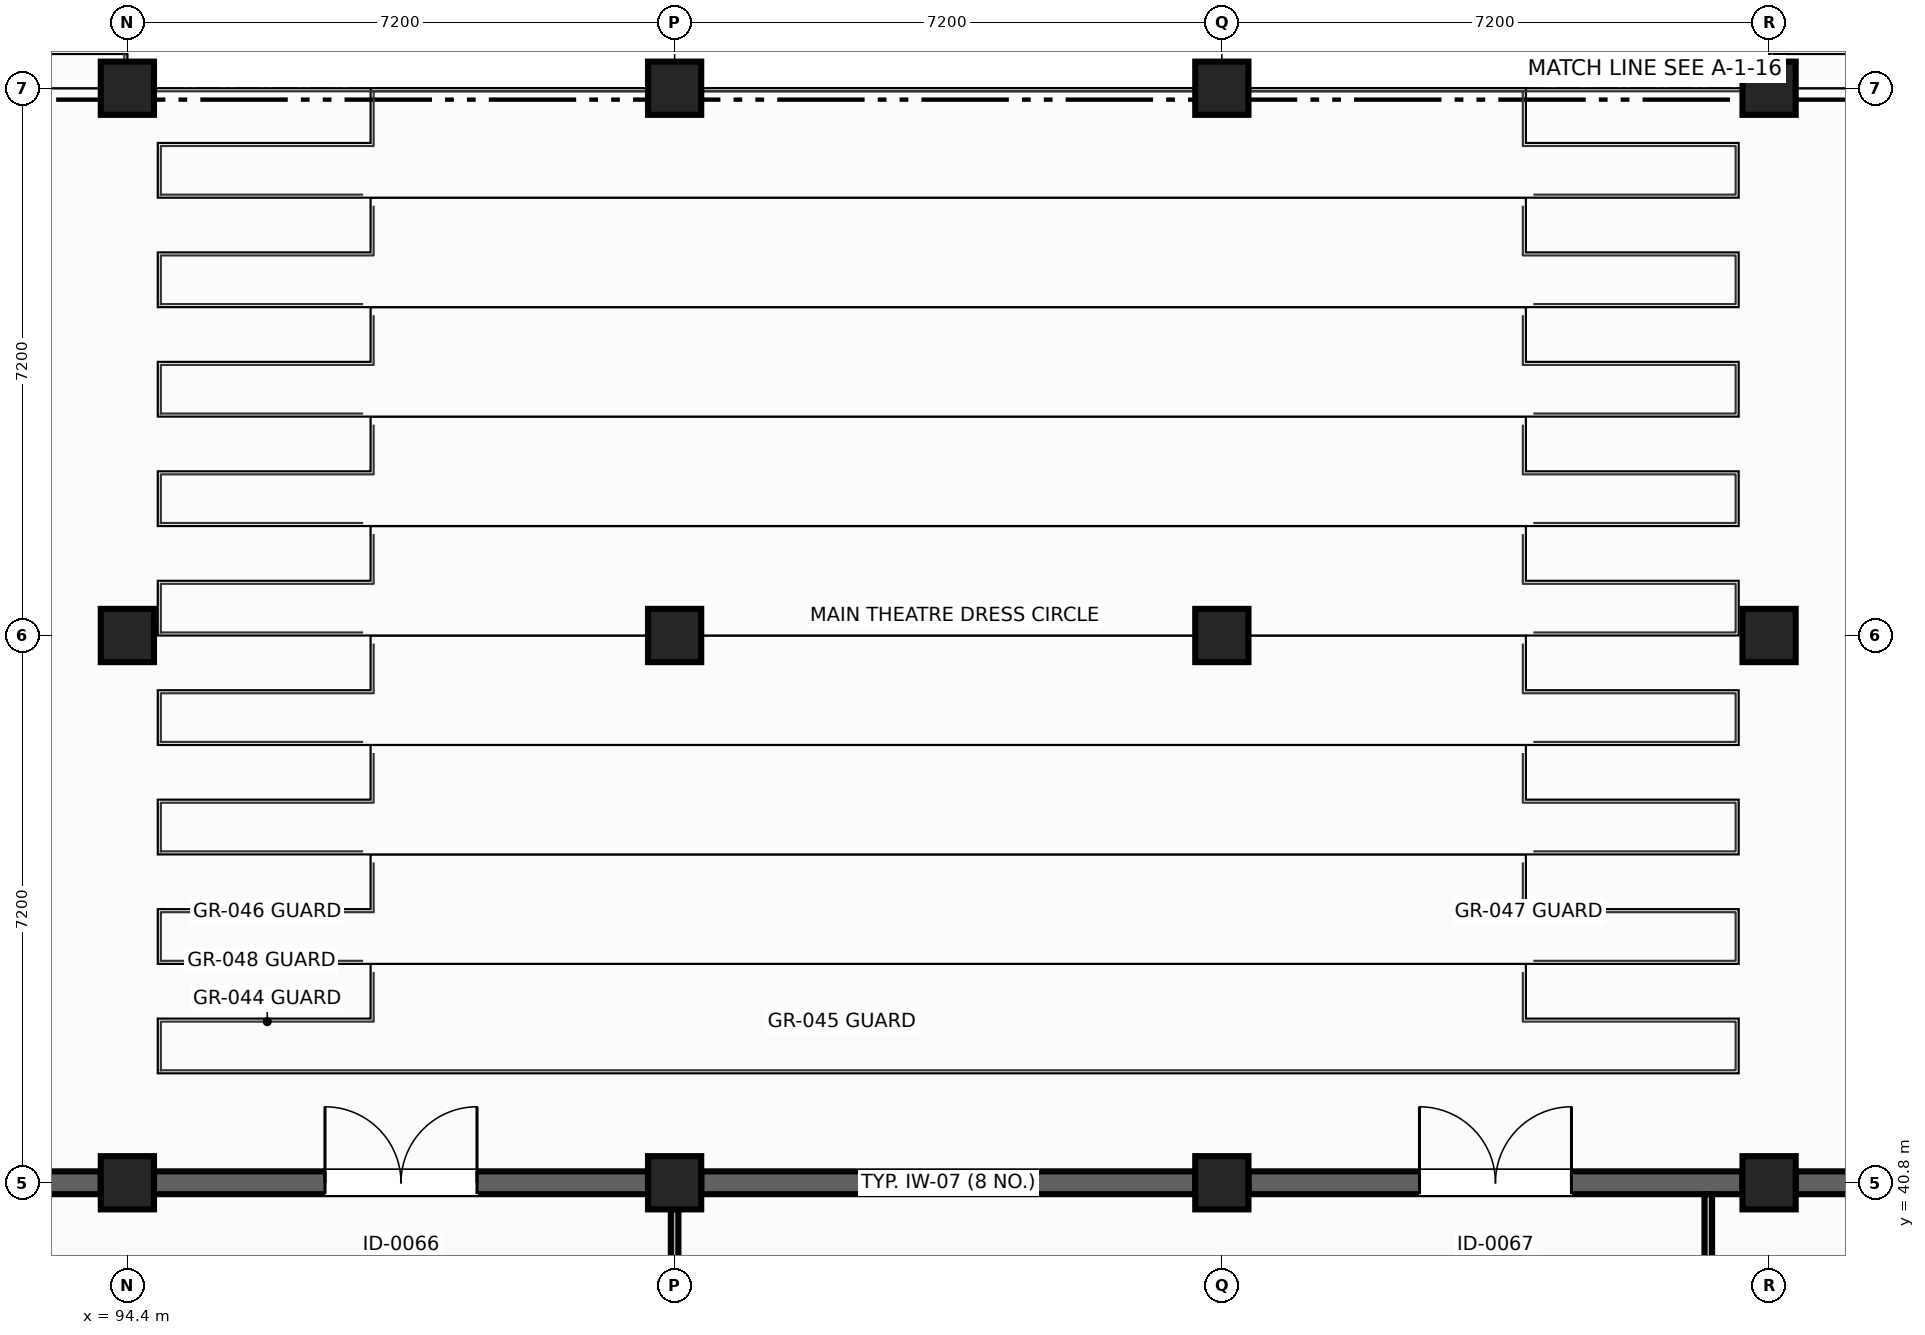
"""IFC4 building model, lengths in metres.
Left out: names, types, materials, properties, quantities, classifications, styles, units other than length and angle.
Written with IfcOpenShell. Run it as: python <this file> out.ifc"""

import sys

from ifc_helpers import new_model, si_unit, direction, frame, frame_2d, origin, origin_2d, place, context, subcontext, project, spatial, rectangle, extrude, element, fill, save


model = new_model("IFC4")
c1 = context("Model", 3, precision=1e-05, world=origin(), true_north=direction((0.0, 1.0)))
c2 = subcontext(c1, "Body", "Model", "MODEL_VIEW")
j1 = project(units=[si_unit("LENGTHUNIT", "METRE"), si_unit("PLANEANGLEUNIT", "RADIAN")], contexts=[c1])
p1 = place(None, origin())
s1 = spatial("IfcSite", under=j1, at=p1, CompositionType="ELEMENT")
p2 = place(p1, origin())
s2 = spatial("IfcBuilding", under=s1, at=p2, CompositionType="ELEMENT")
p3 = place(p2, frame((0.0, 0.0, 5.4)))
s3 = spatial("IfcBuildingStorey", under=s2, at=p3, CompositionType="ELEMENT", Elevation=5.4)
for number, where, z_axis, x_axis in (
    (1, (94.4, 40.8, 0.0), (0.0, 0.0, 1.0), (0.0, 1.0, 0.0)),
    (2, (101.6, 40.8, 0.0), (0.0, 0.0, 1.0), (1.0, 0.0, 0.0)),
    (3, (108.8, 40.8, 0.0), (0.0, 0.0, 1.0), (0.0, 1.0, 0.0)),
    (4, (116.0, 40.8, 0.0), (0.0, 0.0, 1.0), (1.0, 0.0, 0.0)),
):
    element("IfcColumn", number, at=place(p3, frame(where, z_axis=z_axis, x_axis=x_axis)), inside=s3, PredefinedType="COLUMN", context=c2, shape_type="SweptSolid", body=[
        extrude(rectangle(XDim=0.7, YDim=0.7, at=origin_2d()), origin(), (0.0, 0.0, 1.0), 4.5),
    ])
for number, where, z_axis, x_axis in (
    (5, (94.4, 48.0, 0.0), (0.0, 0.0, 1.0), (1.0, 0.0, 0.0)),
    (6, (101.6, 48.0, 0.0), (0.0, 0.0, 1.0), (0.0, 1.0, 0.0)),
    (7, (108.8, 48.0, 0.0), (0.0, 0.0, 1.0), (1.0, 0.0, 0.0)),
    (8, (116.0, 48.0, 0.0), (0.0, 0.0, 1.0), (1.0, 0.0, 0.0)),
    (9, (94.4, 55.2, 0.0), (0.0, 0.0, 1.0), (0.0, 1.0, 0.0)),
    (10, (101.6, 55.2, 0.0), (0.0, 0.0, 1.0), (1.0, 0.0, 0.0)),
    (11, (108.8, 55.2, 0.0), (0.0, 0.0, 1.0), (1.0, 0.0, 0.0)),
    (12, (116.0, 55.2, 0.0), (0.0, 0.0, 1.0), (0.0, 1.0, 0.0)),
):
    element("IfcColumn", number, at=place(p3, frame(where, z_axis=z_axis, x_axis=x_axis)), inside=s3, PredefinedType="COLUMN", context=c2, shape_type="SweptSolid", body=[
        extrude(rectangle(XDim=0.7, YDim=0.7, at=origin_2d()), origin(), (0.0, 0.0, 1.0), 4.2),
    ])
p4 = place(p3, frame((87.55, 40.8, 0.0), z_axis=(0.0, 0.0, 1.0), x_axis=(1.0, 0.0, 0.0)))
e13 = element("IfcWall", 13, at=p4, inside=s3, PredefinedType="SHEAR", context=c2, shape_type="SweptSolid", body=[
    extrude(rectangle(XDim=6.5, YDim=0.3, at=frame_2d((3.25, 0.0))), origin(), (0.0, 0.0, 1.0), 4.2),
])
p5 = place(p4, frame((2.35, 0.0, 0.0)))
e14 = element("IfcOpeningElement", 14, at=p5, cuts=e13, PredefinedType="OPENING", context=c2, shape_type="SweptSolid", body=[
    extrude(rectangle(XDim=1.8, YDim=2.3, at=frame_2d((0.9, 1.15))), frame((0.0, 0.16, 0.0), z_axis=(0.0, -1.0, 0.0), x_axis=(1.0, 0.0, 0.0)), (0.0, 0.0, 1.0), 0.32),
])
p6 = place(p3, frame((94.75, 40.8, 0.0), z_axis=(0.0, 0.0, 1.0), x_axis=(1.0, 0.0, 0.0)))
e15 = element("IfcWall", 15, at=p6, inside=s3, PredefinedType="SHEAR", context=c2, shape_type="SweptSolid", body=[
    extrude(rectangle(XDim=6.5, YDim=0.3, at=frame_2d((3.25, 0.0))), origin(), (0.0, 0.0, 1.0), 4.2),
])
p7 = place(p6, frame((2.25, 0.0, 0.0)))
e16 = element("IfcOpeningElement", 16, at=p7, cuts=e15, PredefinedType="OPENING", context=c2, shape_type="SweptSolid", body=[
    extrude(rectangle(XDim=2.0, YDim=2.35, at=frame_2d((1.0, 1.175))), frame((0.0, 0.16, 0.0), z_axis=(0.0, -1.0, 0.0), x_axis=(1.0, 0.0, 0.0)), (0.0, 0.0, 1.0), 0.32),
])
p8 = place(p3, frame((101.95, 40.8, 0.0), z_axis=(0.0, 0.0, 1.0), x_axis=(1.0, 0.0, 0.0)))
e17 = element("IfcWall", 17, at=p8, inside=s3, PredefinedType="SHEAR", context=c2, shape_type="SweptSolid", body=[
    extrude(rectangle(XDim=6.5, YDim=0.3, at=frame_2d((3.25, 0.0))), origin(), (0.0, 0.0, 1.0), 4.2),
])
p9 = place(p3, frame((109.15, 40.8, 0.0), z_axis=(0.0, 0.0, 1.0), x_axis=(1.0, 0.0, 0.0)))
e18 = element("IfcWall", 18, at=p9, inside=s3, PredefinedType="SHEAR", context=c2, shape_type="SweptSolid", body=[
    extrude(rectangle(XDim=6.5, YDim=0.3, at=frame_2d((3.25, 0.0))), origin(), (0.0, 0.0, 1.0), 4.2),
])
p10 = place(p9, frame((2.25, 0.0, 0.0)))
e19 = element("IfcOpeningElement", 19, at=p10, cuts=e18, PredefinedType="OPENING", context=c2, shape_type="SweptSolid", body=[
    extrude(rectangle(XDim=2.0, YDim=2.35, at=frame_2d((1.0, 1.175))), frame((0.0, 0.16, 0.0), z_axis=(0.0, -1.0, 0.0), x_axis=(1.0, 0.0, 0.0)), (0.0, 0.0, 1.0), 0.32),
])
p11 = place(p3, frame((116.35, 40.8, 0.0), z_axis=(0.0, 0.0, 1.0), x_axis=(1.0, 0.0, 0.0)))
e20 = element("IfcWall", 20, at=p11, inside=s3, PredefinedType="SHEAR", context=c2, shape_type="SweptSolid", body=[
    extrude(rectangle(XDim=6.5, YDim=0.3, at=frame_2d((3.25, 0.0))), origin(), (0.0, 0.0, 1.0), 4.2),
])
p12 = place(p11, frame((2.35, 0.0, 0.0)))
e21 = element("IfcOpeningElement", 21, at=p12, cuts=e20, PredefinedType="OPENING", context=c2, shape_type="SweptSolid", body=[
    extrude(rectangle(XDim=1.8, YDim=2.3, at=frame_2d((0.9, 1.15))), frame((0.0, 0.16, 0.0), z_axis=(0.0, -1.0, 0.0), x_axis=(1.0, 0.0, 0.0)), (0.0, 0.0, 1.0), 0.32),
])
p13 = place(p3, frame((115.2, 33.6, 0.0), z_axis=(0.0, 0.0, 1.0), x_axis=(0.0, 1.0, 0.0)))
e22 = element("IfcWall", 22, at=p13, inside=s3, PredefinedType="PARTITIONING", context=c2, shape_type="SweptSolid", body=[
    extrude(rectangle(XDim=7.048, YDim=0.1, at=frame_2d((3.524, 0.0))), origin(), (0.0, 0.0, 1.0), 3.415),
])
p14 = place(p3, frame((101.6, 40.45, 0.0), z_axis=(0.0, 0.0, 1.0), x_axis=(0.0, -1.0, 0.0)))
e23 = element("IfcWall", 23, at=p14, inside=s3, PredefinedType="PARTITIONING", context=c2, shape_type="SweptSolid", body=[
    extrude(rectangle(XDim=6.5, YDim=0.1, at=frame_2d((3.25, 0.0))), origin(), (0.0, 0.0, 1.0), 3.515),
])
p15 = place(p7, origin())
e24 = element("IfcDoor", 24, at=p15, inside=s3, OperationType="DOUBLE_DOOR_SINGLE_SWING", PredefinedType="DOOR", context=c2, shape_type="SweptSolid", body=[
    extrude(rectangle(XDim=2.0, YDim=2.35, at=frame_2d((1.0, 1.175))), frame((0.0, 0.025, 0.0), z_axis=(0.0, -1.0, 0.0), x_axis=(1.0, 0.0, 0.0)), (0.0, 0.0, 1.0), 0.05),
])
fill(e16, e24)
p16 = place(p10, origin())
e25 = element("IfcDoor", 25, at=p16, inside=s3, OperationType="DOUBLE_DOOR_SINGLE_SWING", PredefinedType="DOOR", context=c2, shape_type="SweptSolid", body=[
    extrude(rectangle(XDim=2.0, YDim=2.35, at=frame_2d((1.0, 1.175))), frame((0.0, 0.025, 0.0), z_axis=(0.0, -1.0, 0.0), x_axis=(1.0, 0.0, 0.0)), (0.0, 0.0, 1.0), 0.05),
])
fill(e19, e25)
save(model, sys.argv[1])
